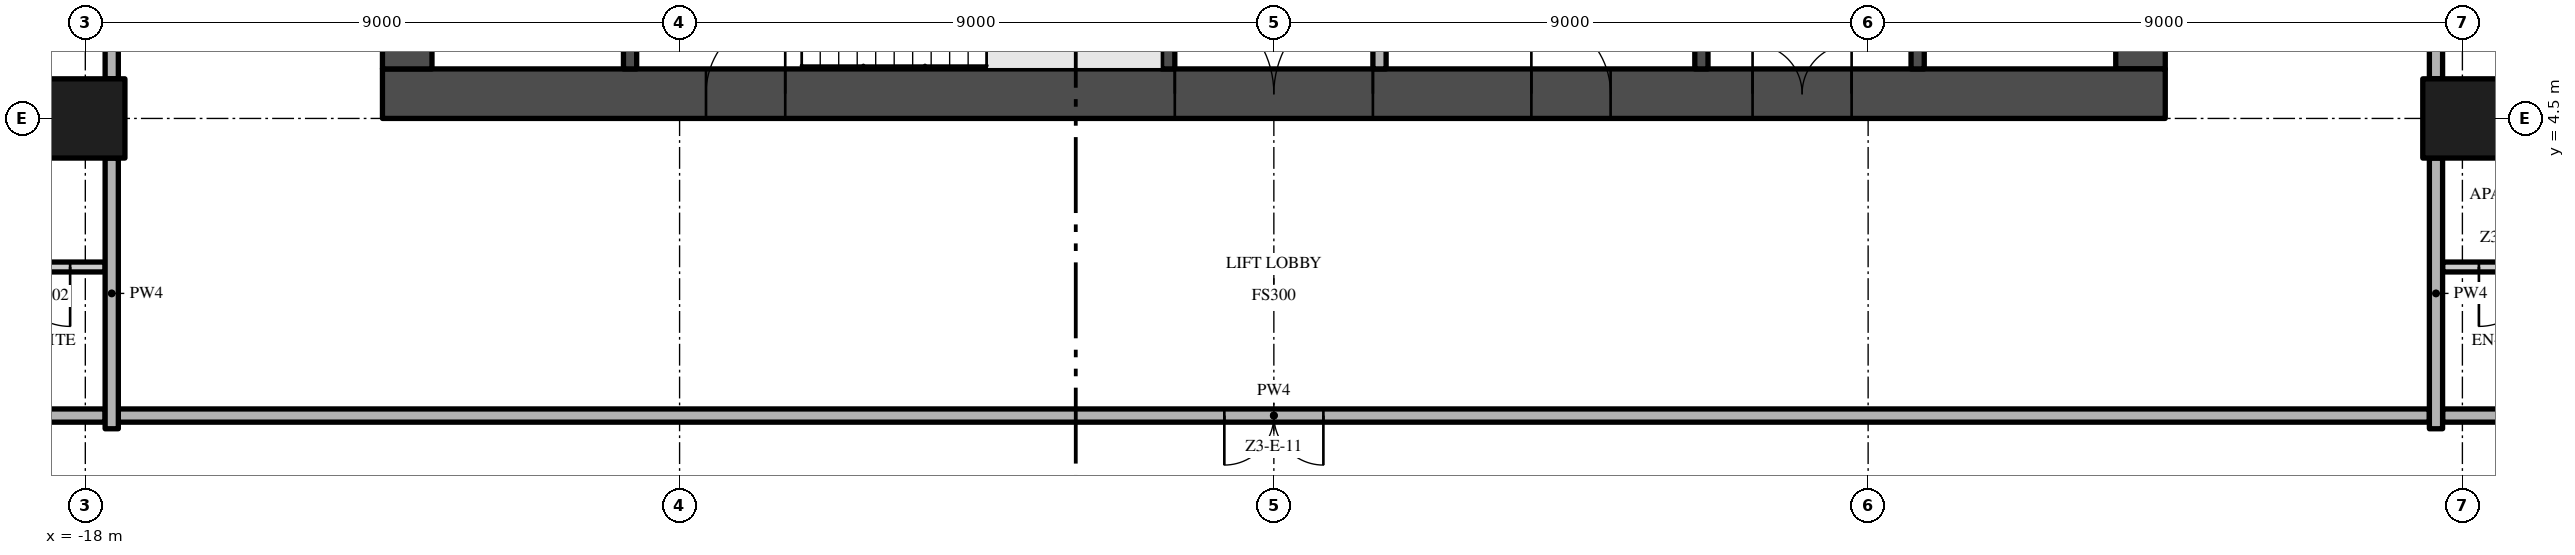
"""IFC4 building model, lengths in metres.
Left out: names, types, materials, properties, quantities, classifications, styles, units other than length and angle.
Written with IfcOpenShell. Run it as: python <this file> out.ifc"""

import sys

from ifc_helpers import new_model, si_unit, direction, frame, frame_2d, origin, origin_2d, place, context, subcontext, project, spatial, rectangle, extrude, element, fill, save


model = new_model("IFC4")
c1 = context("Model", 3, precision=1e-05, world=origin(), true_north=direction((0.0, 1.0)))
c2 = subcontext(c1, "Body", "Model", "MODEL_VIEW")
j1 = project(units=[si_unit("LENGTHUNIT", "METRE"), si_unit("PLANEANGLEUNIT", "RADIAN")], contexts=[c1])
p1 = place(None, origin())
s1 = spatial("IfcSite", under=j1, at=p1, CompositionType="ELEMENT")
p2 = place(p1, origin())
s2 = spatial("IfcBuilding", under=s1, at=p2, CompositionType="ELEMENT")
p3 = place(p2, frame((0.0, 0.0, 166.8)))
s3 = spatial("IfcBuildingStorey", under=s2, at=p3, CompositionType="ELEMENT", Elevation=166.8)
p4 = place(p3, frame((-13.5, 4.875, -0.3), z_axis=(0.0, 0.0, 1.0), x_axis=(1.0, 0.0, 0.0)))
e1 = element("IfcWall", 1, at=p4, inside=s3, PredefinedType="SHEAR", context=c2, shape_type="SweptSolid", body=[
    extrude(rectangle(XDim=27.0, YDim=0.75, at=frame_2d((13.5, 0.0))), origin(), (0.0, 0.0, 1.0), 3.8),
])
p5 = place(p4, frame((12.0, 0.0, 0.3)))
e2 = element("IfcOpeningElement", 2, at=p5, cuts=e1, PredefinedType="OPENING", context=c2, shape_type="SweptSolid", body=[
    extrude(rectangle(XDim=3.0, YDim=2.4, at=frame_2d((1.5, 1.2))), frame((0.0, 0.385, 0.0), z_axis=(0.0, -1.0, 0.0), x_axis=(1.0, 0.0, 0.0)), (0.0, 0.0, 1.0), 0.77),
])
p6 = place(p4, frame((4.9, 0.0, 0.3)))
e3 = element("IfcOpeningElement", 3, at=p6, cuts=e1, PredefinedType="OPENING", context=c2, shape_type="SweptSolid", body=[
    extrude(rectangle(XDim=1.2, YDim=2.2, at=frame_2d((0.6, 1.1))), frame((0.0, 0.385, 0.0), z_axis=(0.0, -1.0, 0.0), x_axis=(1.0, 0.0, 0.0)), (0.0, 0.0, 1.0), 0.77),
])
p7 = place(p4, frame((20.75, 0.0, 0.3)))
e4 = element("IfcOpeningElement", 4, at=p7, cuts=e1, PredefinedType="OPENING", context=c2, shape_type="SweptSolid", body=[
    extrude(rectangle(XDim=1.5, YDim=2.2, at=frame_2d((0.75, 1.1))), frame((0.0, 0.385, 0.0), z_axis=(0.0, -1.0, 0.0), x_axis=(1.0, 0.0, 0.0)), (0.0, 0.0, 1.0), 0.77),
])
p8 = place(p4, frame((17.4, 0.0, 0.3)))
e5 = element("IfcOpeningElement", 5, at=p8, cuts=e1, PredefinedType="OPENING", context=c2, shape_type="SweptSolid", body=[
    extrude(rectangle(XDim=1.2, YDim=2.2, at=frame_2d((0.6, 1.1))), frame((0.0, 0.385, 0.0), z_axis=(0.0, -1.0, 0.0), x_axis=(1.0, 0.0, 0.0)), (0.0, 0.0, 1.0), 0.77),
])
p9 = place(p3, frame((13.125, 5.25, -0.3), z_axis=(0.0, 0.0, 1.0), x_axis=(0.0, 1.0, 0.0)))
e6 = element("IfcWall", 6, at=p9, inside=s3, PredefinedType="SHEAR", context=c2, shape_type="SweptSolid", body=[
    extrude(rectangle(XDim=16.5, YDim=0.75, at=frame_2d((8.25, 0.0))), origin(), (0.0, 0.0, 1.0), 3.8),
])
p10 = place(p9, frame((6.15, 0.0, 0.3)))
e7 = element("IfcOpeningElement", 7, at=p10, cuts=e6, PredefinedType="OPENING", context=c2, shape_type="SweptSolid", body=[
    extrude(rectangle(XDim=1.2, YDim=2.2, at=frame_2d((0.6, 1.1))), frame((0.0, 0.385, 0.0), z_axis=(0.0, -1.0, 0.0), x_axis=(1.0, 0.0, 0.0)), (0.0, 0.0, 1.0), 0.77),
])
p11 = place(p3, frame((-13.125, 21.75, -0.3), z_axis=(0.0, 0.0, 1.0), x_axis=(0.0, -1.0, 0.0)))
e8 = element("IfcWall", 8, at=p11, inside=s3, PredefinedType="SHEAR", context=c2, shape_type="SweptSolid", body=[
    extrude(rectangle(XDim=16.5, YDim=0.75, at=frame_2d((8.25, 0.0))), origin(), (0.0, 0.0, 1.0), 3.8),
])
p12 = place(p11, frame((9.15, 0.0, 0.3)))
e9 = element("IfcOpeningElement", 9, at=p12, cuts=e8, PredefinedType="OPENING", context=c2, shape_type="SweptSolid", body=[
    extrude(rectangle(XDim=1.2, YDim=2.2, at=frame_2d((0.6, 1.1))), frame((0.0, 0.385, 0.0), z_axis=(0.0, -1.0, 0.0), x_axis=(1.0, 0.0, 0.0)), (0.0, 0.0, 1.0), 0.77),
])
for number, where, z_axis, x_axis in (
    (10, (-18.0, 4.5, 0.0), (0.0, 0.0, 1.0), (1.0, 0.0, 0.0)),
    (11, (18.0, 4.5, 0.0), (0.0, 0.0, 1.0), (1.0, 0.0, 0.0)),
):
    element("IfcColumn", number, at=place(p3, frame(where, z_axis=z_axis, x_axis=x_axis)), inside=s3, PredefinedType="COLUMN", context=c2, shape_type="SweptSolid", body=[
        extrude(rectangle(XDim=1.2, YDim=1.2, at=origin_2d()), origin(), (0.0, 0.0, 1.0), 3.5),
    ])
for number, where, z_axis, x_axis in (
    (12, (-9.75, 5.25, 0.0), (0.0, 0.0, 1.0), (0.0, 1.0, 0.0)),
    (13, (-1.6, 5.25, 0.0), (0.0, 0.0, 1.0), (0.0, 1.0, 0.0)),
):
    element("IfcWall", number, at=place(p3, frame(where, z_axis=z_axis, x_axis=x_axis)), inside=s3, PredefinedType="SHEAR", context=c2, shape_type="SweptSolid", body=[
        extrude(rectangle(XDim=2.7, YDim=0.2, at=frame_2d((1.35, 0.0))), origin(), (0.0, 0.0, 1.0), 3.5),
    ])
p13 = place(p3, frame((1.6, 7.5, 0.0), z_axis=(0.0, 0.0, 1.0), x_axis=(0.0, -1.0, 0.0)))
e14 = element("IfcWall", 14, at=p13, inside=s3, PredefinedType="PARTITIONING", context=c2, shape_type="SweptSolid", body=[
    extrude(rectangle(XDim=2.25, YDim=0.2, at=frame_2d((1.125, 0.0))), origin(), (0.0, 0.0, 1.0), 3.5),
])
p14 = place(p13, frame((0.275, 0.0, 0.0)))
e15 = element("IfcOpeningElement", 15, at=p14, cuts=e14, PredefinedType="OPENING", context=c2, shape_type="SweptSolid", body=[
    extrude(rectangle(XDim=0.9, YDim=2.1, at=frame_2d((0.45, 1.05))), frame((0.0, 0.11, 0.0), z_axis=(0.0, -1.0, 0.0), x_axis=(1.0, 0.0, 0.0)), (0.0, 0.0, 1.0), 0.22),
])
p15 = place(p3, frame((6.475, 5.25, 0.0), z_axis=(0.0, 0.0, 1.0), x_axis=(0.0, 1.0, 0.0)))
e16 = element("IfcWall", 16, at=p15, inside=s3, PredefinedType="SHEAR", context=c2, shape_type="SweptSolid", body=[
    extrude(rectangle(XDim=2.25, YDim=0.2, at=frame_2d((1.125, 0.0))), origin(), (0.0, 0.0, 1.0), 3.5),
])
p16 = place(p3, frame((9.75, 5.25, 0.0), z_axis=(0.0, 0.0, 1.0), x_axis=(0.0, 1.0, 0.0)))
e17 = element("IfcWall", 17, at=p16, inside=s3, PredefinedType="SHEAR", context=c2, shape_type="SweptSolid", body=[
    extrude(rectangle(XDim=2.35, YDim=0.2, at=frame_2d((1.175, 0.0))), origin(), (0.0, 0.0, 1.0), 3.5),
])
p17 = place(p16, frame((0.7, 0.0, 0.0)))
e18 = element("IfcOpeningElement", 18, at=p17, cuts=e17, PredefinedType="OPENING", context=c2, shape_type="SweptSolid", body=[
    extrude(rectangle(XDim=1.1, YDim=2.1, at=frame_2d((0.55, 1.05))), frame((0.0, 0.11, 0.0), z_axis=(0.0, -1.0, 0.0), x_axis=(1.0, 0.0, 0.0)), (0.0, 0.0, 1.0), 0.22),
])
p18 = place(p3, frame((17.5, 0.0, 0.0), z_axis=(0.0, 0.0, 1.0), x_axis=(-1.0, 0.0, 0.0)))
e19 = element("IfcWall", 19, at=p18, inside=s3, PredefinedType="PARTITIONING", context=c2, shape_type="SweptSolid", body=[
    extrude(rectangle(XDim=35.0, YDim=0.2, at=frame_2d((17.5, 0.0))), origin(), (0.0, 0.0, 1.0), 3.5),
])
p19 = place(p18, frame((16.75, 0.0, 0.0)))
e20 = element("IfcOpeningElement", 20, at=p19, cuts=e19, PredefinedType="OPENING", context=c2, shape_type="SweptSolid", body=[
    extrude(rectangle(XDim=1.5, YDim=2.4, at=frame_2d((0.75, 1.2))), frame((0.0, 0.11, 0.0), z_axis=(0.0, -1.0, 0.0), x_axis=(1.0, 0.0, 0.0)), (0.0, 0.0, 1.0), 0.22),
])
for number, where, z_axis, x_axis in (
    (21, (-22.2, 0.0, 0.0), (0.0, 0.0, 1.0), (1.0, 0.0, 0.0)),
    (22, (17.7, 0.0, 0.0), (0.0, 0.0, 1.0), (1.0, 0.0, 0.0)),
):
    element("IfcWall", number, at=place(p3, frame(where, z_axis=z_axis, x_axis=x_axis)), inside=s3, PredefinedType="PARTITIONING", context=c2, shape_type="SweptSolid", body=[
        extrude(rectangle(XDim=4.5, YDim=0.2, at=frame_2d((2.25, 0.0))), origin(), (0.0, 0.0, 1.0), 3.5),
    ])
p20 = place(p3, frame((-17.7, 2.25, 0.0), z_axis=(0.0, 0.0, 1.0), x_axis=(-1.0, 0.0, 0.0)))
e23 = element("IfcWall", 23, at=p20, inside=s3, PredefinedType="PARTITIONING", context=c2, shape_type="SweptSolid", body=[
    extrude(rectangle(XDim=2.03, YDim=0.15, at=frame_2d((1.015, 0.0))), origin(), (0.0, 0.0, 1.0), 3.5),
])
p21 = place(p20, frame((0.53, 0.0, 0.0)))
e24 = element("IfcOpeningElement", 24, at=p21, cuts=e23, PredefinedType="OPENING", context=c2, shape_type="SweptSolid", body=[
    extrude(rectangle(XDim=0.9, YDim=2.1, at=frame_2d((0.45, 1.05))), frame((0.0, 0.085, 0.0), z_axis=(0.0, -1.0, 0.0), x_axis=(1.0, 0.0, 0.0)), (0.0, 0.0, 1.0), 0.17),
])
p22 = place(p3, frame((19.73, 2.25, 0.0), z_axis=(0.0, 0.0, 1.0), x_axis=(-1.0, 0.0, 0.0)))
e25 = element("IfcWall", 25, at=p22, inside=s3, PredefinedType="PARTITIONING", context=c2, shape_type="SweptSolid", body=[
    extrude(rectangle(XDim=2.03, YDim=0.15, at=frame_2d((1.015, 0.0))), origin(), (0.0, 0.0, 1.0), 3.5),
])
p23 = place(p22, frame((0.58, 0.0, 0.0)))
e26 = element("IfcOpeningElement", 26, at=p23, cuts=e25, PredefinedType="OPENING", context=c2, shape_type="SweptSolid", body=[
    extrude(rectangle(XDim=0.9, YDim=2.1, at=frame_2d((0.45, 1.05))), frame((0.0, 0.085, 0.0), z_axis=(0.0, -1.0, 0.0), x_axis=(1.0, 0.0, 0.0)), (0.0, 0.0, 1.0), 0.17),
])
p24 = place(p3, frame((-17.6, -0.2, 0.0), z_axis=(0.0, 0.0, 1.0), x_axis=(0.0, 1.0, 0.0)))
e27 = element("IfcWall", 27, at=p24, inside=s3, PredefinedType="PARTITIONING", context=c2, shape_type="SweptSolid", body=[
    extrude(rectangle(XDim=4.1, YDim=0.2, at=frame_2d((2.05, 0.0))), origin(), (0.0, 0.0, 1.0), 3.5),
])
p25 = place(p3, frame((-17.6, 5.1, 0.0), z_axis=(0.0, 0.0, 1.0), x_axis=(0.0, 1.0, 0.0)))
e28 = element("IfcWall", 28, at=p25, inside=s3, PredefinedType="PARTITIONING", context=c2, shape_type="SweptSolid", body=[
    extrude(rectangle(XDim=7.8, YDim=0.2, at=frame_2d((3.9, 0.0))), origin(), (0.0, 0.0, 1.0), 3.5),
])
p26 = place(p25, frame((1.05, 0.0, 0.0)))
e29 = element("IfcOpeningElement", 29, at=p26, cuts=e28, PredefinedType="OPENING", context=c2, shape_type="SweptSolid", body=[
    extrude(rectangle(XDim=1.2, YDim=2.4, at=frame_2d((0.6, 1.2))), frame((0.0, 0.11, 0.0), z_axis=(0.0, -1.0, 0.0), x_axis=(1.0, 0.0, 0.0)), (0.0, 0.0, 1.0), 0.22),
])
p27 = place(p3, frame((17.6, -0.2, 0.0), z_axis=(0.0, 0.0, 1.0), x_axis=(0.0, 1.0, 0.0)))
e30 = element("IfcWall", 30, at=p27, inside=s3, PredefinedType="PARTITIONING", context=c2, shape_type="SweptSolid", body=[
    extrude(rectangle(XDim=4.1, YDim=0.2, at=frame_2d((2.05, 0.0))), origin(), (0.0, 0.0, 1.0), 3.5),
])
p28 = place(p3, frame((17.6, 12.9, 0.0), z_axis=(0.0, 0.0, 1.0), x_axis=(0.0, -1.0, 0.0)))
e31 = element("IfcWall", 31, at=p28, inside=s3, PredefinedType="PARTITIONING", context=c2, shape_type="SweptSolid", body=[
    extrude(rectangle(XDim=7.8, YDim=0.2, at=frame_2d((3.9, 0.0))), origin(), (0.0, 0.0, 1.0), 3.5),
])
p29 = place(p28, frame((5.55, 0.0, 0.0)))
e32 = element("IfcOpeningElement", 32, at=p29, cuts=e31, PredefinedType="OPENING", context=c2, shape_type="SweptSolid", body=[
    extrude(rectangle(XDim=1.2, YDim=2.4, at=frame_2d((0.6, 1.2))), frame((0.0, 0.11, 0.0), z_axis=(0.0, -1.0, 0.0), x_axis=(1.0, 0.0, 0.0)), (0.0, 0.0, 1.0), 0.22),
])
p30 = place(p5, frame((3.0, 0.0, 0.0), z_axis=(0.0, 0.0, 1.0), x_axis=(-1.0, 0.0, 0.0)))
e33 = element("IfcDoor", 33, at=p30, inside=s3, OperationType="DOUBLE_DOOR_SINGLE_SWING", PredefinedType="DOOR", context=c2, shape_type="SweptSolid", body=[
    extrude(rectangle(XDim=3.0, YDim=2.4, at=frame_2d((1.5, 1.2))), frame((0.0, 0.025, 0.0), z_axis=(0.0, -1.0, 0.0), x_axis=(1.0, 0.0, 0.0)), (0.0, 0.0, 1.0), 0.05),
])
fill(e2, e33)
p31 = place(p6, frame((1.2, 0.0, 0.0), z_axis=(0.0, 0.0, 1.0), x_axis=(-1.0, 0.0, 0.0)))
e34 = element("IfcDoor", 34, at=p31, inside=s3, OperationType="SINGLE_SWING_LEFT", PredefinedType="DOOR", context=c2, shape_type="SweptSolid", body=[
    extrude(rectangle(XDim=1.2, YDim=2.2, at=frame_2d((0.6, 1.1))), frame((0.0, 0.025, 0.0), z_axis=(0.0, -1.0, 0.0), x_axis=(1.0, 0.0, 0.0)), (0.0, 0.0, 1.0), 0.05),
])
fill(e3, e34)
p32 = place(p7, frame((1.5, 0.0, 0.0), z_axis=(0.0, 0.0, 1.0), x_axis=(-1.0, 0.0, 0.0)))
e35 = element("IfcDoor", 35, at=p32, inside=s3, OperationType="DOUBLE_DOOR_SINGLE_SWING", PredefinedType="DOOR", context=c2, shape_type="SweptSolid", body=[
    extrude(rectangle(XDim=1.5, YDim=2.2, at=frame_2d((0.75, 1.1))), frame((0.0, 0.025, 0.0), z_axis=(0.0, -1.0, 0.0), x_axis=(1.0, 0.0, 0.0)), (0.0, 0.0, 1.0), 0.05),
])
fill(e4, e35)
p33 = place(p8, frame((1.2, 0.0, 0.0), z_axis=(0.0, 0.0, 1.0), x_axis=(-1.0, 0.0, 0.0)))
e36 = element("IfcDoor", 36, at=p33, inside=s3, OperationType="SINGLE_SWING_RIGHT", PredefinedType="DOOR", context=c2, shape_type="SweptSolid", body=[
    extrude(rectangle(XDim=1.2, YDim=2.2, at=frame_2d((0.6, 1.1))), frame((0.0, 0.025, 0.0), z_axis=(0.0, -1.0, 0.0), x_axis=(1.0, 0.0, 0.0)), (0.0, 0.0, 1.0), 0.05),
])
fill(e5, e36)
p34 = place(p21, origin())
e37 = element("IfcDoor", 37, at=p34, inside=s3, OperationType="SINGLE_SWING_LEFT", PredefinedType="DOOR", context=c2, shape_type="SweptSolid", body=[
    extrude(rectangle(XDim=0.9, YDim=2.1, at=frame_2d((0.45, 1.05))), frame((0.0, 0.025, 0.0), z_axis=(0.0, -1.0, 0.0), x_axis=(1.0, 0.0, 0.0)), (0.0, 0.0, 1.0), 0.05),
])
fill(e24, e37)
p35 = place(p23, origin())
e38 = element("IfcDoor", 38, at=p35, inside=s3, OperationType="SINGLE_SWING_RIGHT", PredefinedType="DOOR", context=c2, shape_type="SweptSolid", body=[
    extrude(rectangle(XDim=0.9, YDim=2.1, at=frame_2d((0.45, 1.05))), frame((0.0, 0.025, 0.0), z_axis=(0.0, -1.0, 0.0), x_axis=(1.0, 0.0, 0.0)), (0.0, 0.0, 1.0), 0.05),
])
fill(e26, e38)
p36 = place(p19, origin())
e39 = element("IfcDoor", 39, at=p36, inside=s3, OperationType="DOUBLE_DOOR_SINGLE_SWING", PredefinedType="DOOR", context=c2, shape_type="SweptSolid", body=[
    extrude(rectangle(XDim=1.5, YDim=2.4, at=frame_2d((0.75, 1.2))), frame((0.0, 0.025, 0.0), z_axis=(0.0, -1.0, 0.0), x_axis=(1.0, 0.0, 0.0)), (0.0, 0.0, 1.0), 0.05),
])
fill(e20, e39)
save(model, sys.argv[1])
